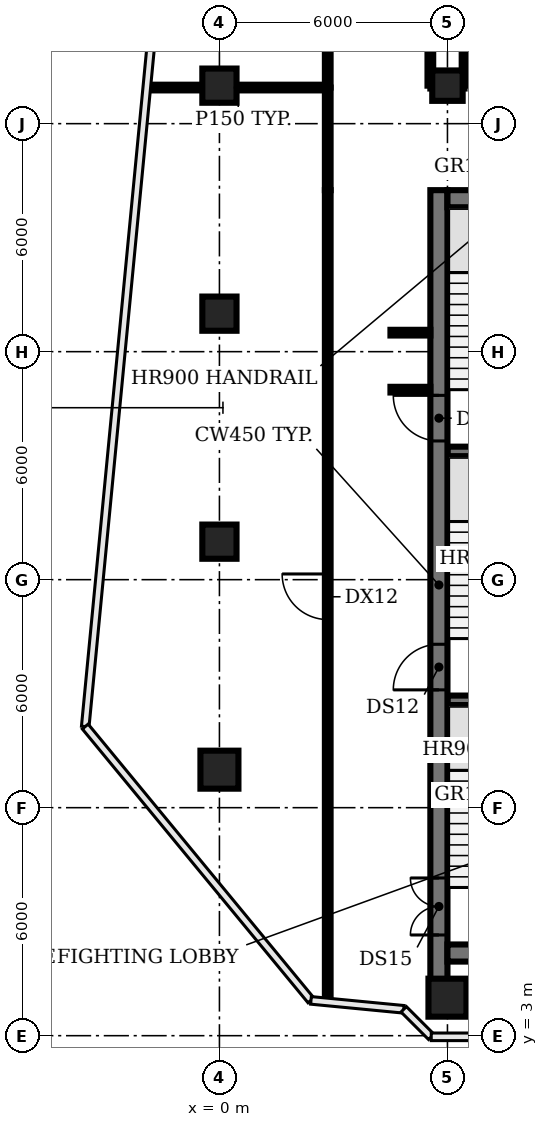
"""IFC4 building model, lengths in metres.
Left out: names, types, materials, properties, quantities, classifications, styles, units other than length and angle.
Written with IfcOpenShell. Run it as: python <this file> out.ifc"""

import sys

from ifc_helpers import new_model, si_unit, direction, frame, frame_2d, origin, origin_2d, place, context, subcontext, project, spatial, rectangle, circle, extrude, element, fill, save


model = new_model("IFC4")
c1 = context("Model", 3, precision=1e-05, world=origin(), true_north=direction((0.0, 1.0)))
c2 = subcontext(c1, "Body", "Model", "MODEL_VIEW")
j1 = project(units=[si_unit("LENGTHUNIT", "METRE"), si_unit("PLANEANGLEUNIT", "RADIAN")], contexts=[c1])
p1 = place(None, origin())
s1 = spatial("IfcSite", under=j1, at=p1, CompositionType="ELEMENT")
p2 = place(p1, origin())
s2 = spatial("IfcBuilding", under=s1, at=p2, CompositionType="ELEMENT")
p3 = place(p2, frame((0.0, 0.0, 251.6)))
s3 = spatial("IfcBuildingStorey", under=s2, at=p3, CompositionType="ELEMENT", Elevation=251.6)
p4 = place(p3, frame((0.0, 10.0, 0.0), z_axis=(0.0, 0.0, 1.0), x_axis=(1.0, 0.0, 0.0)))
e1 = element("IfcColumn", 1, at=p4, inside=s3, PredefinedType="COLUMN", context=c2, shape_type="SweptSolid", body=[
    extrude(circle(Radius=0.5, at=origin_2d()), origin(), (0.0, 0.0, 1.0), 3.2),
])
for number, where, z_axis, x_axis in (
    (2, (0.0, 16.0, 0.0), (0.0, 0.0, 1.0), (1.0, 0.0, 0.0)),
    (3, (0.0, 22.0, 0.0), (0.0, 0.0, 1.0), (1.0, 0.0, 0.0)),
    (4, (0.0, 28.0, 0.0), (0.0, 0.0, 1.0), (1.0, 0.0, 0.0)),
):
    element("IfcColumn", number, at=place(p3, frame(where, z_axis=z_axis, x_axis=x_axis)), inside=s3, PredefinedType="COLUMN", context=c2, shape_type="SweptSolid", body=[
        extrude(rectangle(XDim=0.9, YDim=0.9, at=origin_2d()), origin(), (0.0, 0.0, 1.0), 3.2),
    ])
p5 = place(p3, frame((6.0, 4.0, 0.0), z_axis=(0.0, 0.0, 1.0), x_axis=(1.0, 0.0, 0.0)))
e5 = element("IfcColumn", 5, at=p5, inside=s3, PredefinedType="COLUMN", context=c2, shape_type="SweptSolid", body=[
    extrude(circle(Radius=0.5, at=origin_2d()), origin(), (0.0, 0.0, 1.0), 3.2),
])
p6 = place(p3, frame((6.0, 28.0, 0.0), z_axis=(0.0, 0.0, 1.0), x_axis=(1.0, 0.0, 0.0)))
e6 = element("IfcColumn", 6, at=p6, inside=s3, PredefinedType="COLUMN", context=c2, shape_type="SweptSolid", body=[
    extrude(rectangle(XDim=0.8, YDim=0.8, at=origin_2d()), origin(), (0.0, 0.0, 1.0), 3.2),
])
for number, where, z_axis, x_axis in (
    (7, (6.0, 11.825, 0.0), (0.0, 0.0, 1.0), (1.0, 0.0, 0.0)),
    (8, (6.0, 18.375, 0.0), (0.0, 0.0, 1.0), (1.0, 0.0, 0.0)),
):
    element("IfcWall", number, at=place(p3, frame(where, z_axis=z_axis, x_axis=x_axis)), inside=s3, PredefinedType="SHEAR", context=c2, shape_type="SweptSolid", body=[
        extrude(rectangle(XDim=3.15, YDim=0.25, at=frame_2d((1.575, 0.0))), origin(), (0.0, 0.0, 1.0), 3.8),
    ])
p7 = place(p3, frame((5.775, 4.47, 0.0), z_axis=(0.0, 0.0, 1.0), x_axis=(0.0, 1.0, 0.0)))
e9 = element("IfcWall", 9, at=p7, inside=s3, PredefinedType="SHEAR", context=c2, shape_type="SweptSolid", body=[
    extrude(rectangle(XDim=20.78, YDim=0.45, at=frame_2d((10.39, 0.0))), origin(), (0.0, 0.0, 1.0), 3.8),
])
p8 = place(p7, frame((1.18, 0.0, 0.0)))
e10 = element("IfcOpeningElement", 10, at=p8, cuts=e9, PredefinedType="OPENING", context=c2, shape_type="SweptSolid", body=[
    extrude(rectangle(XDim=1.5, YDim=2.1, at=frame_2d((0.75, 1.05))), frame((0.0, 0.235, 0.0), z_axis=(0.0, -1.0, 0.0), x_axis=(1.0, 0.0, 0.0)), (0.0, 0.0, 1.0), 0.47),
])
p9 = place(p7, frame((7.63, 0.0, 0.0)))
e11 = element("IfcOpeningElement", 11, at=p9, cuts=e9, PredefinedType="OPENING", context=c2, shape_type="SweptSolid", body=[
    extrude(rectangle(XDim=1.2, YDim=2.1, at=frame_2d((0.6, 1.05))), frame((0.0, 0.235, 0.0), z_axis=(0.0, -1.0, 0.0), x_axis=(1.0, 0.0, 0.0)), (0.0, 0.0, 1.0), 0.47),
])
p10 = place(p7, frame((14.18, 0.0, 0.0)))
e12 = element("IfcOpeningElement", 12, at=p10, cuts=e9, PredefinedType="OPENING", context=c2, shape_type="SweptSolid", body=[
    extrude(rectangle(XDim=1.2, YDim=2.1, at=frame_2d((0.6, 1.05))), frame((0.0, 0.235, 0.0), z_axis=(0.0, -1.0, 0.0), x_axis=(1.0, 0.0, 0.0)), (0.0, 0.0, 1.0), 0.47),
])
p11 = place(p3, frame((24.0, 5.175, 0.0), z_axis=(0.0, 0.0, 1.0), x_axis=(-1.0, 0.0, 0.0)))
e13 = element("IfcWall", 13, at=p11, inside=s3, PredefinedType="SHEAR", context=c2, shape_type="SweptSolid", body=[
    extrude(rectangle(XDim=18.0, YDim=0.45, at=frame_2d((9.0, 0.0))), origin(), (0.0, 0.0, 1.0), 3.8),
])
p12 = place(p11, frame((0.825, 0.0, 0.0)))
e14 = element("IfcOpeningElement", 14, at=p12, cuts=e13, PredefinedType="OPENING", context=c2, shape_type="SweptSolid", body=[
    extrude(rectangle(XDim=1.5, YDim=2.1, at=frame_2d((0.75, 1.05))), frame((0.0, 0.235, 0.0), z_axis=(0.0, -1.0, 0.0), x_axis=(1.0, 0.0, 0.0)), (0.0, 0.0, 1.0), 0.47),
])
p13 = place(p11, frame((15.675, 0.0, 0.0)))
e15 = element("IfcOpeningElement", 15, at=p13, cuts=e13, PredefinedType="OPENING", context=c2, shape_type="SweptSolid", body=[
    extrude(rectangle(XDim=1.5, YDim=2.1, at=frame_2d((0.75, 1.05))), frame((0.0, 0.235, 0.0), z_axis=(0.0, -1.0, 0.0), x_axis=(1.0, 0.0, 0.0)), (0.0, 0.0, 1.0), 0.47),
])
p14 = place(p11, frame((13.0, 0.0, 0.0)))
e16 = element("IfcOpeningElement", 16, at=p14, cuts=e13, PredefinedType="OPENING", context=c2, shape_type="SweptSolid", body=[
    extrude(rectangle(XDim=1.2, YDim=2.1, at=frame_2d((0.6, 1.05))), frame((0.0, 0.235, 0.0), z_axis=(0.0, -1.0, 0.0), x_axis=(1.0, 0.0, 0.0)), (0.0, 0.0, 1.0), 0.47),
])
p15 = place(p11, frame((4.35, 0.0, 0.0)))
e17 = element("IfcOpeningElement", 17, at=p15, cuts=e13, PredefinedType="OPENING", context=c2, shape_type="SweptSolid", body=[
    extrude(rectangle(XDim=1.0, YDim=2.1, at=frame_2d((0.5, 1.05))), frame((0.0, 0.235, 0.0), z_axis=(0.0, -1.0, 0.0), x_axis=(1.0, 0.0, 0.0)), (0.0, 0.0, 1.0), 0.47),
])
p16 = place(p3, frame((6.0, 25.025, 0.0), z_axis=(0.0, 0.0, 1.0), x_axis=(1.0, 0.0, 0.0)))
e18 = element("IfcWall", 18, at=p16, inside=s3, PredefinedType="SHEAR", context=c2, shape_type="SweptSolid", body=[
    extrude(rectangle(XDim=18.0, YDim=0.45, at=frame_2d((9.0, 0.0))), origin(), (0.0, 0.0, 1.0), 3.8),
])
p17 = place(p3, frame((-1.86, 27.95, 0.0), z_axis=(0.0, 0.0, 1.0), x_axis=(1.0, 0.0, 0.0)))
e19 = element("IfcWall", 19, at=p17, inside=s3, PredefinedType="PARTITIONING", context=c2, shape_type="SweptSolid", body=[
    extrude(rectangle(XDim=4.71, YDim=0.15, at=frame_2d((2.355, 0.0))), origin(), (0.0, 0.0, 1.0), 2.83),
])
p18 = place(p3, frame((2.85, 3.94, 0.0), z_axis=(0.0, 0.0, 1.0), x_axis=(0.0, 1.0, 0.0)))
e20 = element("IfcWall", 20, at=p18, inside=s3, PredefinedType="PARTITIONING", context=c2, shape_type="SweptSolid", body=[
    extrude(rectangle(XDim=21.31, YDim=0.15, at=frame_2d((10.655, 0.0))), origin(), (0.0, 0.0, 1.0), 2.83),
])
p19 = place(p18, frame((10.01, 0.0, 0.0)))
e21 = element("IfcOpeningElement", 21, at=p19, cuts=e20, PredefinedType="OPENING", context=c2, shape_type="SweptSolid", body=[
    extrude(rectangle(XDim=1.2, YDim=2.1, at=frame_2d((0.6, 1.05))), frame((0.0, 0.085, 0.0), z_axis=(0.0, -1.0, 0.0), x_axis=(1.0, 0.0, 0.0)), (0.0, 0.0, 1.0), 0.17),
])
p20 = place(p3, frame((2.85, 25.25, 0.0), z_axis=(0.0, 0.0, 1.0), x_axis=(0.0, 1.0, 0.0)))
e22 = element("IfcWall", 22, at=p20, inside=s3, PredefinedType="PARTITIONING", context=c2, shape_type="SweptSolid", body=[
    extrude(rectangle(XDim=2.7, YDim=0.15, at=frame_2d((1.35, 0.0))), origin(), (0.0, 0.0, 1.0), 2.83),
])
p21 = place(p3, frame((2.85, 27.95, 0.0), z_axis=(0.0, 0.0, 1.0), x_axis=(0.0, 1.0, 0.0)))
e23 = element("IfcWall", 23, at=p21, inside=s3, PredefinedType="PARTITIONING", context=c2, shape_type="SweptSolid", body=[
    extrude(rectangle(XDim=1.2, YDim=0.15, at=frame_2d((0.6, 0.0))), origin(), (0.0, 0.0, 1.0), 2.83),
])
for number, where, z_axis, x_axis in (
    (24, (4.5, 20.0, 0.0), (0.0, 0.0, 1.0), (1.0, 0.0, 0.0)),
    (25, (4.5, 21.5, 0.0), (0.0, 0.0, 1.0), (1.0, 0.0, 0.0)),
):
    element("IfcWall", number, at=place(p3, frame(where, z_axis=z_axis, x_axis=x_axis)), inside=s3, PredefinedType="PARTITIONING", context=c2, shape_type="SweptSolid", body=[
        extrude(rectangle(XDim=1.05, YDim=0.15, at=frame_2d((0.525, 0.0))), origin(), (0.0, 0.0, 1.0), 2.83),
    ])
p22 = place(p3, frame((5.55, 28.0, 0.0), z_axis=(0.0, 0.0, 1.0), x_axis=(0.0, 1.0, 0.0)))
e26 = element("IfcWall", 26, at=p22, inside=s3, PredefinedType="PARTITIONING", context=c2, shape_type="SweptSolid", body=[
    extrude(rectangle(XDim=1.15, YDim=0.15, at=frame_2d((0.575, 0.0))), origin(), (0.0, 0.0, 1.0), 2.83),
])
p23 = place(p3, frame((5.55, 28.0, 0.0), z_axis=(0.0, 0.0, 1.0), x_axis=(1.0, 0.0, 0.0)))
e27 = element("IfcWall", 27, at=p23, inside=s3, PredefinedType="PARTITIONING", context=c2, shape_type="SweptSolid", body=[
    extrude(rectangle(XDim=0.9, YDim=0.15, at=frame_2d((0.45, 0.0))), origin(), (0.0, 0.0, 1.0), 2.83),
])
p24 = place(p3, frame((6.45, 28.0, 0.0), z_axis=(0.0, 0.0, 1.0), x_axis=(0.0, 1.0, 0.0)))
e28 = element("IfcWall", 28, at=p24, inside=s3, PredefinedType="PARTITIONING", context=c2, shape_type="SweptSolid", body=[
    extrude(rectangle(XDim=1.15, YDim=0.15, at=frame_2d((0.575, 0.0))), origin(), (0.0, 0.0, 1.0), 2.83),
])
p25 = place(p8, origin())
e29 = element("IfcDoor", 29, at=p25, inside=s3, OperationType="DOUBLE_DOOR_SINGLE_SWING", PredefinedType="DOOR", context=c2, shape_type="SweptSolid", body=[
    extrude(rectangle(XDim=1.5, YDim=2.1, at=frame_2d((0.75, 1.05))), frame((0.0, 0.025, 0.0), z_axis=(0.0, -1.0, 0.0), x_axis=(1.0, 0.0, 0.0)), (0.0, 0.0, 1.0), 0.05),
])
fill(e10, e29)
p26 = place(p9, origin())
e30 = element("IfcDoor", 30, at=p26, inside=s3, OperationType="SINGLE_SWING_LEFT", PredefinedType="DOOR", context=c2, shape_type="SweptSolid", body=[
    extrude(rectangle(XDim=1.2, YDim=2.1, at=frame_2d((0.6, 1.05))), frame((0.0, 0.025, 0.0), z_axis=(0.0, -1.0, 0.0), x_axis=(1.0, 0.0, 0.0)), (0.0, 0.0, 1.0), 0.05),
])
fill(e11, e30)
p27 = place(p10, origin())
e31 = element("IfcDoor", 31, at=p27, inside=s3, OperationType="SINGLE_SWING_RIGHT", PredefinedType="DOOR", context=c2, shape_type="SweptSolid", body=[
    extrude(rectangle(XDim=1.2, YDim=2.1, at=frame_2d((0.6, 1.05))), frame((0.0, 0.025, 0.0), z_axis=(0.0, -1.0, 0.0), x_axis=(1.0, 0.0, 0.0)), (0.0, 0.0, 1.0), 0.05),
])
fill(e12, e31)
p28 = place(p19, origin())
e32 = element("IfcDoor", 32, at=p28, inside=s3, OperationType="SINGLE_SWING_RIGHT", PredefinedType="DOOR", context=c2, shape_type="SweptSolid", body=[
    extrude(rectangle(XDim=1.2, YDim=2.1, at=frame_2d((0.6, 1.05))), frame((0.0, 0.025, 0.0), z_axis=(0.0, -1.0, 0.0), x_axis=(1.0, 0.0, 0.0)), (0.0, 0.0, 1.0), 0.05),
])
fill(e21, e32)
save(model, sys.argv[1])
